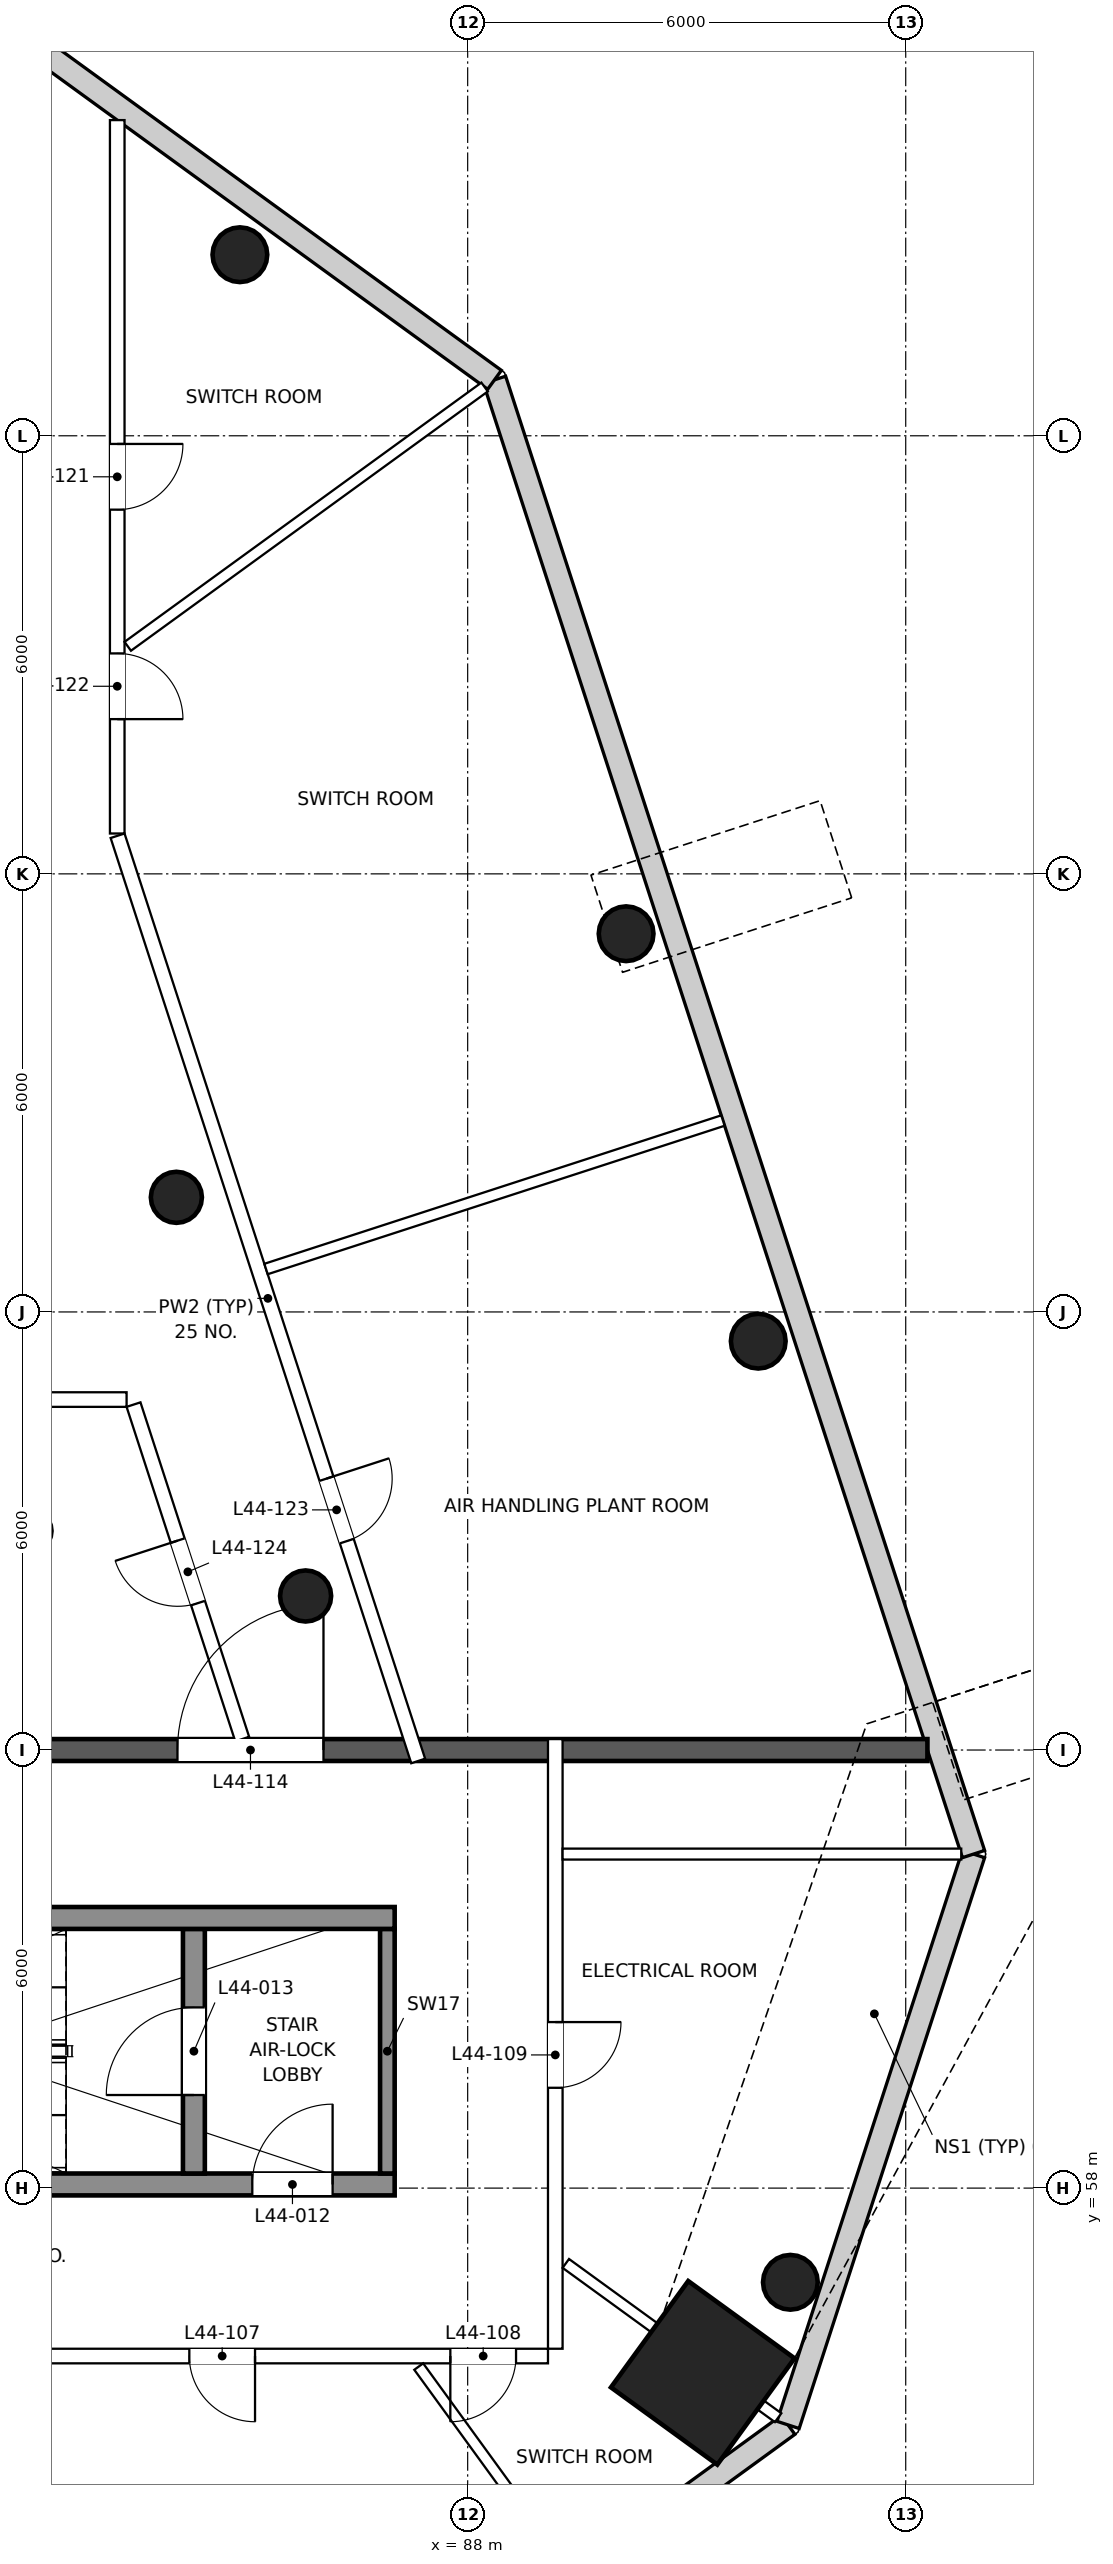
"""IFC4 building model, lengths in metres.
Left out: names, types, materials, properties, quantities, classifications, styles, units other than length and angle.
Written with IfcOpenShell. Run it as: python <this file> out.ifc"""

import sys

from ifc_helpers import new_model, si_unit, direction, frame, frame_2d, origin, origin_2d, place, context, subcontext, project, spatial, rectangle, circle, extrude, element, fill, save


model = new_model("IFC4")
c1 = context("Model", 3, precision=1e-05, world=origin(), true_north=direction((0.0, 1.0)))
c2 = subcontext(c1, "Body", "Model", "MODEL_VIEW")
j1 = project(units=[si_unit("LENGTHUNIT", "METRE"), si_unit("PLANEANGLEUNIT", "RADIAN")], contexts=[c1])
p1 = place(None, origin())
s1 = spatial("IfcSite", under=j1, at=p1, CompositionType="ELEMENT")
p2 = place(p1, origin())
s2 = spatial("IfcBuilding", under=s1, at=p2, CompositionType="ELEMENT")
p3 = place(p2, frame((0.0, 0.0, 191.5)))
s3 = spatial("IfcBuildingStorey", under=s2, at=p3, CompositionType="ELEMENT", Elevation=191.5)
p4 = place(p3, frame((91.22, 55.47, 0.0), z_axis=(0.0, 0.0, 1.0), x_axis=(0.809016994375, -0.587785252292, 0.0)))
e1 = element("IfcColumn", 1, at=p4, inside=s3, PredefinedType="COLUMN", context=c2, shape_type="SweptSolid", body=[
    extrude(rectangle(XDim=1.8, YDim=1.8, at=origin_2d()), origin(), (0.0, 0.0, 1.0), 5.0),
])
for number, where, z_axis, x_axis in (
    (2, (92.42, 56.71, 0.0), (0.0, 0.0, 1.0), (1.0, 0.0, 0.0)),
    (3, (91.98, 69.6, 0.0), (0.0, 0.0, 1.0), (1.0, 0.0, 0.0)),
    (4, (90.17, 75.18, 0.0), (0.0, 0.0, 1.0), (1.0, 0.0, 0.0)),
    (5, (84.88, 84.48, 0.0), (0.0, 0.0, 1.0), (1.0, 0.0, 0.0)),
):
    element("IfcColumn", number, at=place(p3, frame(where, z_axis=z_axis, x_axis=x_axis)), inside=s3, PredefinedType="COLUMN", context=c2, shape_type="SweptSolid", body=[
        extrude(circle(Radius=0.375, at=origin_2d()), origin(), (0.0, 0.0, 1.0), 5.0),
    ])
for number, where, z_axis, x_axis in (
    (6, (85.78, 66.11, 0.0), (0.0, 0.0, 1.0), (1.0, 0.0, 0.0)),
    (7, (84.01, 71.57, 0.0), (0.0, 0.0, 1.0), (1.0, 0.0, 0.0)),
):
    element("IfcColumn", number, at=place(p3, frame(where, z_axis=z_axis, x_axis=x_axis)), inside=s3, PredefinedType="COLUMN", context=c2, shape_type="SweptSolid", body=[
        extrude(circle(Radius=0.35, at=origin_2d()), origin(), (0.0, 0.0, 1.0), 5.0),
    ])
p5 = place(p3, frame((74.391, 41.681, 0.0), z_axis=(0.0, 0.0, 1.0), x_axis=(0.809015997552, 0.5877866243, 0.0)))
e8 = element("IfcWall", 8, at=p5, inside=s3, PredefinedType="SOLIDWALL", context=c2, shape_type="SweptSolid", body=[
    extrude(rectangle(XDim=22.246, YDim=0.32, at=frame_2d((11.123, 0.0))), origin(), (0.0, 0.0, 1.0), 4.7),
])
p6 = place(p3, frame((92.388, 54.757, 0.0), z_axis=(0.0, 0.0, 1.0), x_axis=(0.30901958848, 0.951055673415, 0.0)))
e9 = element("IfcWall", 9, at=p6, inside=s3, PredefinedType="SOLIDWALL", context=c2, shape_type="SweptSolid", body=[
    extrude(rectangle(XDim=8.22, YDim=0.32, at=frame_2d((4.11, 0.0))), origin(), (0.0, 0.0, 1.0), 4.7),
])
p7 = place(p3, frame((94.929, 62.575, 0.0), z_axis=(0.0, 0.0, 1.0), x_axis=(-0.309022366866, 0.95105477065, 0.0)))
e10 = element("IfcWall", 10, at=p7, inside=s3, PredefinedType="SOLIDWALL", context=c2, shape_type="SweptSolid", body=[
    extrude(rectangle(XDim=21.231, YDim=0.32, at=frame_2d((10.615, 0.0))), origin(), (0.0, 0.0, 1.0), 4.7),
])
p8 = place(p3, frame((88.368, 82.767, 0.0), z_axis=(0.0, 0.0, 1.0), x_axis=(-0.809011202415, 0.587793224159, 0.0)))
e11 = element("IfcWall", 11, at=p8, inside=s3, PredefinedType="SOLIDWALL", context=c2, shape_type="SweptSolid", body=[
    extrude(rectangle(XDim=8.631, YDim=0.32, at=frame_2d((4.316, 0.0))), origin(), (0.0, 0.0, 1.0), 4.7),
])
p9 = place(p3, frame((75.1, 58.05, 0.0), z_axis=(0.0, 0.0, 1.0), x_axis=(1.0, 0.0, 0.0)))
e12 = element("IfcWall", 12, at=p9, inside=s3, PredefinedType="SHEAR", context=c2, shape_type="SweptSolid", body=[
    extrude(rectangle(XDim=11.9, YDim=0.3, at=frame_2d((5.95, 0.0))), origin(), (0.0, 0.0, 1.0), 5.0),
])
p10 = place(p9, frame((9.95, 0.0, 0.0)))
e13 = element("IfcOpeningElement", 13, at=p10, cuts=e12, PredefinedType="OPENING", context=c2, shape_type="SweptSolid", body=[
    extrude(rectangle(XDim=1.1, YDim=2.1, at=frame_2d((0.55, 1.05))), frame((0.0, 0.16, 0.0), z_axis=(0.0, -1.0, 0.0), x_axis=(1.0, 0.0, 0.0)), (0.0, 0.0, 1.0), 0.32),
])
p11 = place(p3, frame((84.25, 58.2, 0.0), z_axis=(0.0, 0.0, 1.0), x_axis=(0.0, 1.0, 0.0)))
e14 = element("IfcWall", 14, at=p11, inside=s3, PredefinedType="SHEAR", context=c2, shape_type="SweptSolid", body=[
    extrude(rectangle(XDim=3.35, YDim=0.3, at=frame_2d((1.675, 0.0))), origin(), (0.0, 0.0, 1.0), 5.0),
])
p12 = place(p11, frame((1.075, 0.0, 0.0)))
e15 = element("IfcOpeningElement", 15, at=p12, cuts=e14, PredefinedType="OPENING", context=c2, shape_type="SweptSolid", body=[
    extrude(rectangle(XDim=1.2, YDim=2.1, at=frame_2d((0.6, 1.05))), frame((0.0, 0.16, 0.0), z_axis=(0.0, -1.0, 0.0), x_axis=(1.0, 0.0, 0.0)), (0.0, 0.0, 1.0), 0.32),
])
p13 = place(p3, frame((86.9, 58.2, 0.0), z_axis=(0.0, 0.0, 1.0), x_axis=(0.0, 1.0, 0.0)))
e16 = element("IfcWall", 16, at=p13, inside=s3, PredefinedType="SHEAR", context=c2, shape_type="SweptSolid", body=[
    extrude(rectangle(XDim=3.35, YDim=0.2, at=frame_2d((1.675, 0.0))), origin(), (0.0, 0.0, 1.0), 5.0),
])
p14 = place(p3, frame((75.1, 61.7, 0.0), z_axis=(0.0, 0.0, 1.0), x_axis=(1.0, 0.0, 0.0)))
e17 = element("IfcWall", 17, at=p14, inside=s3, PredefinedType="SHEAR", context=c2, shape_type="SweptSolid", body=[
    extrude(rectangle(XDim=11.9, YDim=0.3, at=frame_2d((5.95, 0.0))), origin(), (0.0, 0.0, 1.0), 5.0),
])
p15 = place(p3, frame((45.703, 64.0, 0.0), z_axis=(0.0, 0.0, 1.0), x_axis=(1.0, 0.0, 0.0)))
e18 = element("IfcWall", 18, at=p15, inside=s3, PredefinedType="PARTITIONING", context=c2, shape_type="SweptSolid", body=[
    extrude(rectangle(XDim=48.595, YDim=0.3, at=frame_2d((24.297, 0.0))), origin(), (0.0, 0.0, 1.0), 3.7),
])
p16 = place(p15, frame((8.272, 0.0, 0.0)))
e19 = element("IfcOpeningElement", 19, at=p16, cuts=e18, PredefinedType="OPENING", context=c2, shape_type="SweptSolid", body=[
    extrude(rectangle(XDim=2.0, YDim=2.1, at=frame_2d((1.0, 1.05))), frame((0.0, 0.16, 0.0), z_axis=(0.0, -1.0, 0.0), x_axis=(1.0, 0.0, 0.0)), (0.0, 0.0, 1.0), 0.32),
])
p17 = place(p15, frame((16.322, 0.0, 0.0)))
e20 = element("IfcOpeningElement", 20, at=p17, cuts=e18, PredefinedType="OPENING", context=c2, shape_type="SweptSolid", body=[
    extrude(rectangle(XDim=2.0, YDim=2.1, at=frame_2d((1.0, 1.05))), frame((0.0, 0.16, 0.0), z_axis=(0.0, -1.0, 0.0), x_axis=(1.0, 0.0, 0.0)), (0.0, 0.0, 1.0), 0.32),
])
p18 = place(p15, frame((23.697, 0.0, 0.0)))
e21 = element("IfcOpeningElement", 21, at=p18, cuts=e18, PredefinedType="OPENING", context=c2, shape_type="SweptSolid", body=[
    extrude(rectangle(XDim=1.2, YDim=2.1, at=frame_2d((0.6, 1.05))), frame((0.0, 0.16, 0.0), z_axis=(0.0, -1.0, 0.0), x_axis=(1.0, 0.0, 0.0)), (0.0, 0.0, 1.0), 0.32),
])
p19 = place(p15, frame((30.272, 0.0, 0.0)))
e22 = element("IfcOpeningElement", 22, at=p19, cuts=e18, PredefinedType="OPENING", context=c2, shape_type="SweptSolid", body=[
    extrude(rectangle(XDim=2.0, YDim=2.1, at=frame_2d((1.0, 1.05))), frame((0.0, 0.16, 0.0), z_axis=(0.0, -1.0, 0.0), x_axis=(1.0, 0.0, 0.0)), (0.0, 0.0, 1.0), 0.32),
])
p20 = place(p15, frame((38.322, 0.0, 0.0)))
e23 = element("IfcOpeningElement", 23, at=p20, cuts=e18, PredefinedType="OPENING", context=c2, shape_type="SweptSolid", body=[
    extrude(rectangle(XDim=2.0, YDim=2.1, at=frame_2d((1.0, 1.05))), frame((0.0, 0.16, 0.0), z_axis=(0.0, -1.0, 0.0), x_axis=(1.0, 0.0, 0.0)), (0.0, 0.0, 1.0), 0.32),
])
p21 = place(p3, frame((83.2, 86.323, 0.0), z_axis=(0.0, 0.0, 1.0), x_axis=(0.0, -1.0, 0.0)))
e24 = element("IfcWall", 24, at=p21, inside=s3, PredefinedType="PARTITIONING", context=c2, shape_type="SweptSolid", body=[
    extrude(rectangle(XDim=9.771, YDim=0.2, at=frame_2d((4.885, 0.0))), origin(), (0.0, 0.0, 1.0), 4.25),
])
p22 = place(p21, frame((4.435, 0.0, 0.0)))
e25 = element("IfcOpeningElement", 25, at=p22, cuts=e24, PredefinedType="OPENING", context=c2, shape_type="SweptSolid", body=[
    extrude(rectangle(XDim=0.9, YDim=2.1, at=frame_2d((0.45, 1.05))), frame((0.0, 0.11, 0.0), z_axis=(0.0, -1.0, 0.0), x_axis=(1.0, 0.0, 0.0)), (0.0, 0.0, 1.0), 0.22),
])
p23 = place(p21, frame((7.304, 0.0, 0.0)))
e26 = element("IfcOpeningElement", 26, at=p23, cuts=e24, PredefinedType="OPENING", context=c2, shape_type="SweptSolid", body=[
    extrude(rectangle(XDim=0.9, YDim=2.1, at=frame_2d((0.45, 1.05))), frame((0.0, 0.11, 0.0), z_axis=(0.0, -1.0, 0.0), x_axis=(1.0, 0.0, 0.0)), (0.0, 0.0, 1.0), 0.22),
])
p24 = place(p3, frame((83.205, 76.522, 0.0), z_axis=(0.0, 0.0, 1.0), x_axis=(0.309023094896, -0.951054534094, 0.0)))
e27 = element("IfcWall", 27, at=p24, inside=s3, PredefinedType="PARTITIONING", context=c2, shape_type="SweptSolid", body=[
    extrude(rectangle(XDim=13.324, YDim=0.2, at=frame_2d((6.662, 0.0))), origin(), (0.0, 0.0, 1.0), 3.7),
])
p25 = place(p24, frame((9.258, 0.0, 0.0)))
e28 = element("IfcOpeningElement", 28, at=p25, cuts=e27, PredefinedType="OPENING", context=c2, shape_type="SweptSolid", body=[
    extrude(rectangle(XDim=0.9, YDim=2.1, at=frame_2d((0.45, 1.05))), frame((0.0, 0.11, 0.0), z_axis=(0.0, -1.0, 0.0), x_axis=(1.0, 0.0, 0.0)), (0.0, 0.0, 1.0), 0.22),
])
p26 = place(p3, frame((89.2, 64.15, 0.0), z_axis=(0.0, 0.0, 1.0), x_axis=(0.0, -1.0, 0.0)))
e29 = element("IfcWall", 29, at=p26, inside=s3, PredefinedType="PARTITIONING", context=c2, shape_type="SweptSolid", body=[
    extrude(rectangle(XDim=8.35, YDim=0.2, at=frame_2d((4.175, 0.0))), origin(), (0.0, 0.0, 1.0), 4.0),
])
p27 = place(p26, frame((3.876, 0.0, 0.0)))
e30 = element("IfcOpeningElement", 30, at=p27, cuts=e29, PredefinedType="OPENING", context=c2, shape_type="SweptSolid", body=[
    extrude(rectangle(XDim=0.9, YDim=2.1, at=frame_2d((0.45, 1.05))), frame((0.0, 0.11, 0.0), z_axis=(0.0, -1.0, 0.0), x_axis=(1.0, 0.0, 0.0)), (0.0, 0.0, 1.0), 0.22),
])
p28 = place(p3, frame((89.1, 55.7, 0.0), z_axis=(0.0, 0.0, 1.0), x_axis=(-1.0, 0.0, 0.0)))
e31 = element("IfcWall", 31, at=p28, inside=s3, PredefinedType="PARTITIONING", context=c2, shape_type="SweptSolid", body=[
    extrude(rectangle(XDim=7.018, YDim=0.2, at=frame_2d((3.509, 0.0))), origin(), (0.0, 0.0, 1.0), 4.0),
])
p29 = place(p28, frame((4.013, 0.0, 0.0)))
e32 = element("IfcOpeningElement", 32, at=p29, cuts=e31, PredefinedType="OPENING", context=c2, shape_type="SweptSolid", body=[
    extrude(rectangle(XDim=0.9, YDim=2.1, at=frame_2d((0.45, 1.05))), frame((0.0, 0.11, 0.0), z_axis=(0.0, -1.0, 0.0), x_axis=(1.0, 0.0, 0.0)), (0.0, 0.0, 1.0), 0.22),
])
p30 = place(p28, frame((0.438, 0.0, 0.0)))
e33 = element("IfcOpeningElement", 33, at=p30, cuts=e31, PredefinedType="OPENING", context=c2, shape_type="SweptSolid", body=[
    extrude(rectangle(XDim=0.9, YDim=2.1, at=frame_2d((0.45, 1.05))), frame((0.0, 0.11, 0.0), z_axis=(0.0, -1.0, 0.0), x_axis=(1.0, 0.0, 0.0)), (0.0, 0.0, 1.0), 0.22),
])
p31 = place(p3, frame((84.912, 64.15, 0.0), z_axis=(0.0, 0.0, 1.0), x_axis=(-0.309026476021, 0.951053435469, 0.0)))
e34 = element("IfcWall", 34, at=p31, inside=s3, PredefinedType="PARTITIONING", context=c2, shape_type="SweptSolid", body=[
    extrude(rectangle(XDim=4.817, YDim=0.2, at=frame_2d((2.408, 0.0))), origin(), (0.0, 0.0, 1.0), 3.7),
])
p32 = place(p31, frame((1.958, 0.0, 0.0)))
e35 = element("IfcOpeningElement", 35, at=p32, cuts=e34, PredefinedType="OPENING", context=c2, shape_type="SweptSolid", body=[
    extrude(rectangle(XDim=0.9, YDim=2.1, at=frame_2d((0.45, 1.05))), frame((0.0, 0.11, 0.0), z_axis=(0.0, -1.0, 0.0), x_axis=(1.0, 0.0, 0.0)), (0.0, 0.0, 1.0), 0.22),
])
p33 = place(p3, frame((83.328, 68.8, 0.0), z_axis=(0.0, 0.0, 1.0), x_axis=(-1.0, 0.0, 0.0)))
e36 = element("IfcWall", 36, at=p33, inside=s3, PredefinedType="PARTITIONING", context=c2, shape_type="SweptSolid", body=[
    extrude(rectangle(XDim=12.128, YDim=0.2, at=frame_2d((6.064, 0.0))), origin(), (0.0, 0.0, 1.0), 4.7),
])
p34 = place(p33, frame((5.614, 0.0, 0.0)))
e37 = element("IfcOpeningElement", 37, at=p34, cuts=e36, PredefinedType="OPENING", context=c2, shape_type="SweptSolid", body=[
    extrude(rectangle(XDim=0.9, YDim=2.1, at=frame_2d((0.45, 1.05))), frame((0.0, 0.11, 0.0), z_axis=(0.0, -1.0, 0.0), x_axis=(1.0, 0.0, 0.0)), (0.0, 0.0, 1.0), 0.22),
])
p35 = place(p3, frame((92.252, 54.856, 0.0), z_axis=(0.0, 0.0, 1.0), x_axis=(-0.809035551496, 0.587759709759, 0.0)))
e38 = element("IfcWall", 38, at=p35, inside=s3, PredefinedType="PARTITIONING", context=c2, shape_type="SweptSolid", body=[
    extrude(rectangle(XDim=3.595, YDim=0.15, at=frame_2d((1.797, 0.0))), origin(), (0.0, 0.0, 1.0), 3.7),
])
p36 = place(p3, frame((94.76, 62.575, 0.0), z_axis=(0.0, 0.0, 1.0), x_axis=(-1.0, 0.0, 0.0)))
e39 = element("IfcWall", 39, at=p36, inside=s3, PredefinedType="PARTITIONING", context=c2, shape_type="SweptSolid", body=[
    extrude(rectangle(XDim=5.46, YDim=0.15, at=frame_2d((2.73, 0.0))), origin(), (0.0, 0.0, 1.0), 3.7),
])
p37 = place(p3, frame((88.232, 82.668, 0.0), z_axis=(0.0, 0.0, 1.0), x_axis=(-0.809024323682, -0.587775164234, 0.0)))
e40 = element("IfcWall", 40, at=p37, inside=s3, PredefinedType="PARTITIONING", context=c2, shape_type="SweptSolid", body=[
    extrude(rectangle(XDim=6.042, YDim=0.15, at=frame_2d((3.021, 0.0))), origin(), (0.0, 0.0, 1.0), 4.0),
])
p38 = place(p3, frame((89.363, 52.757, 0.0), z_axis=(0.0, 0.0, 1.0), x_axis=(-0.587760469668, 0.809034999426, 0.0)))
e41 = element("IfcWall", 41, at=p38, inside=s3, PredefinedType="PARTITIONING", context=c2, shape_type="SweptSolid", body=[
    extrude(rectangle(XDim=3.46, YDim=0.15, at=frame_2d((1.73, 0.0))), origin(), (0.0, 0.0, 1.0), 4.0),
])
p39 = place(p3, frame((91.496, 72.621, 0.0), z_axis=(0.0, 0.0, 1.0), x_axis=(-0.95105288048, -0.309028184041, 0.0)))
e42 = element("IfcWall", 42, at=p39, inside=s3, PredefinedType="PARTITIONING", context=c2, shape_type="SweptSolid", body=[
    extrude(rectangle(XDim=6.58, YDim=0.15, at=frame_2d((3.29, 0.0))), origin(), (0.0, 0.0, 1.0), 3.7),
])
p40 = place(p10, origin())
e43 = element("IfcDoor", 43, at=p40, inside=s3, OperationType="SINGLE_SWING_RIGHT", PredefinedType="DOOR", context=c2, shape_type="SweptSolid", body=[
    extrude(rectangle(XDim=1.1, YDim=2.1, at=frame_2d((0.55, 1.05))), frame((0.0, 0.025, 0.0), z_axis=(0.0, -1.0, 0.0), x_axis=(1.0, 0.0, 0.0)), (0.0, 0.0, 1.0), 0.05),
])
fill(e13, e43)
p41 = place(p12, origin())
e44 = element("IfcDoor", 44, at=p41, inside=s3, OperationType="SINGLE_SWING_LEFT", PredefinedType="DOOR", context=c2, shape_type="SweptSolid", body=[
    extrude(rectangle(XDim=1.2, YDim=2.1, at=frame_2d((0.6, 1.05))), frame((0.0, 0.025, 0.0), z_axis=(0.0, -1.0, 0.0), x_axis=(1.0, 0.0, 0.0)), (0.0, 0.0, 1.0), 0.05),
])
fill(e15, e44)
p42 = place(p29, origin())
e45 = element("IfcDoor", 45, at=p42, inside=s3, OperationType="SINGLE_SWING_LEFT", PredefinedType="DOOR", context=c2, shape_type="SweptSolid", body=[
    extrude(rectangle(XDim=0.9, YDim=2.1, at=frame_2d((0.45, 1.05))), frame((0.0, 0.025, 0.0), z_axis=(0.0, -1.0, 0.0), x_axis=(1.0, 0.0, 0.0)), (0.0, 0.0, 1.0), 0.05),
])
fill(e32, e45)
p43 = place(p30, origin())
e46 = element("IfcDoor", 46, at=p43, inside=s3, OperationType="SINGLE_SWING_RIGHT", PredefinedType="DOOR", context=c2, shape_type="SweptSolid", body=[
    extrude(rectangle(XDim=0.9, YDim=2.1, at=frame_2d((0.45, 1.05))), frame((0.0, 0.025, 0.0), z_axis=(0.0, -1.0, 0.0), x_axis=(1.0, 0.0, 0.0)), (0.0, 0.0, 1.0), 0.05),
])
fill(e33, e46)
p44 = place(p27, origin())
e47 = element("IfcDoor", 47, at=p44, inside=s3, OperationType="SINGLE_SWING_LEFT", PredefinedType="DOOR", context=c2, shape_type="SweptSolid", body=[
    extrude(rectangle(XDim=0.9, YDim=2.1, at=frame_2d((0.45, 1.05))), frame((0.0, 0.025, 0.0), z_axis=(0.0, -1.0, 0.0), x_axis=(1.0, 0.0, 0.0)), (0.0, 0.0, 1.0), 0.05),
])
fill(e30, e47)
p45 = place(p20, origin())
e48 = element("IfcDoor", 48, at=p45, inside=s3, OperationType="DOUBLE_DOOR_SINGLE_SWING", PredefinedType="DOOR", context=c2, shape_type="SweptSolid", body=[
    extrude(rectangle(XDim=2.0, YDim=2.1, at=frame_2d((1.0, 1.05))), frame((0.0, 0.025, 0.0), z_axis=(0.0, -1.0, 0.0), x_axis=(1.0, 0.0, 0.0)), (0.0, 0.0, 1.0), 0.05),
])
fill(e23, e48)
p46 = place(p22, origin())
e49 = element("IfcDoor", 49, at=p46, inside=s3, OperationType="SINGLE_SWING_LEFT", PredefinedType="DOOR", context=c2, shape_type="SweptSolid", body=[
    extrude(rectangle(XDim=0.9, YDim=2.1, at=frame_2d((0.45, 1.05))), frame((0.0, 0.025, 0.0), z_axis=(0.0, -1.0, 0.0), x_axis=(1.0, 0.0, 0.0)), (0.0, 0.0, 1.0), 0.05),
])
fill(e25, e49)
p47 = place(p23, origin())
e50 = element("IfcDoor", 50, at=p47, inside=s3, OperationType="SINGLE_SWING_RIGHT", PredefinedType="DOOR", context=c2, shape_type="SweptSolid", body=[
    extrude(rectangle(XDim=0.9, YDim=2.1, at=frame_2d((0.45, 1.05))), frame((0.0, 0.025, 0.0), z_axis=(0.0, -1.0, 0.0), x_axis=(1.0, 0.0, 0.0)), (0.0, 0.0, 1.0), 0.05),
])
fill(e26, e50)
p48 = place(p25, origin())
e51 = element("IfcDoor", 51, at=p48, inside=s3, OperationType="SINGLE_SWING_LEFT", PredefinedType="DOOR", context=c2, shape_type="SweptSolid", body=[
    extrude(rectangle(XDim=0.9, YDim=2.1, at=frame_2d((0.45, 1.05))), frame((0.0, 0.025, 0.0), z_axis=(0.0, -1.0, 0.0), x_axis=(1.0, 0.0, 0.0)), (0.0, 0.0, 1.0), 0.05),
])
fill(e28, e51)
p49 = place(p32, origin())
e52 = element("IfcDoor", 52, at=p49, inside=s3, OperationType="SINGLE_SWING_RIGHT", PredefinedType="DOOR", context=c2, shape_type="SweptSolid", body=[
    extrude(rectangle(XDim=0.9, YDim=2.1, at=frame_2d((0.45, 1.05))), frame((0.0, 0.025, 0.0), z_axis=(0.0, -1.0, 0.0), x_axis=(1.0, 0.0, 0.0)), (0.0, 0.0, 1.0), 0.05),
])
fill(e35, e52)
save(model, sys.argv[1])
